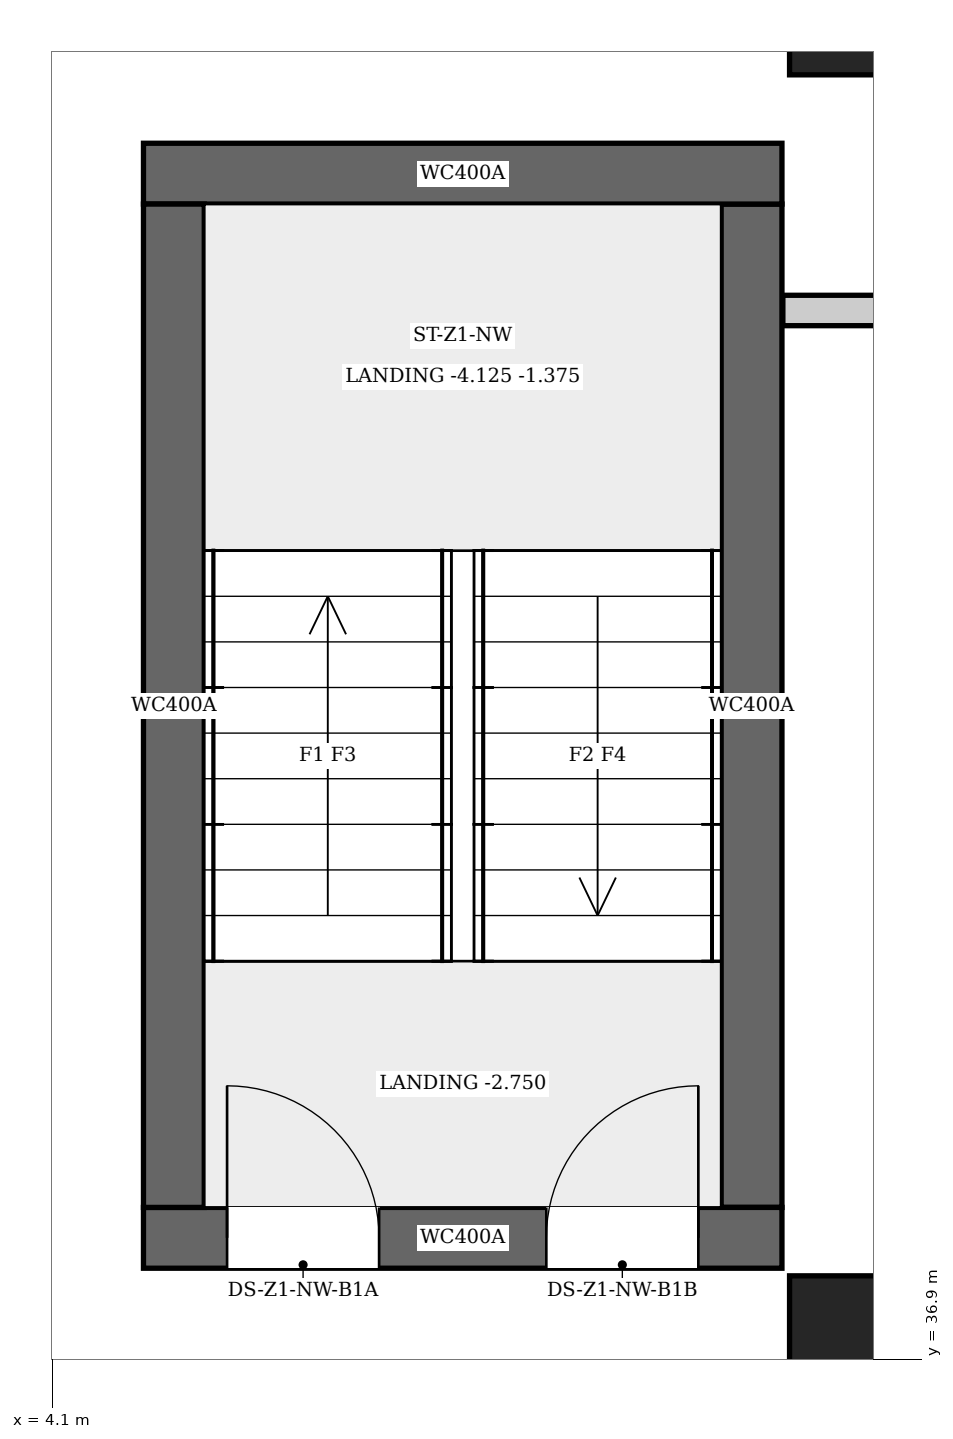
"""IFC4 building model, lengths in metres.
Left out: names, types, materials, properties, quantities, classifications, styles, units other than length and angle.
Written with IfcOpenShell. Run it as: python <this file> out.ifc"""

import sys

from ifc_helpers import new_model, si_unit, direction, frame, frame_2d, origin, origin_2d, place, context, subcontext, project, spatial, rectangle, extrude, element, fill, save


model = new_model("IFC4")
c1 = context("Model", 3, precision=1e-05, world=origin(), true_north=direction((0.0, 1.0)))
c2 = subcontext(c1, "Body", "Model", "MODEL_VIEW")
j1 = project(units=[si_unit("LENGTHUNIT", "METRE"), si_unit("PLANEANGLEUNIT", "RADIAN")], contexts=[c1])
p1 = place(None, origin())
s1 = spatial("IfcSite", under=j1, at=p1, CompositionType="ELEMENT")
p2 = place(p1, origin())
s2 = spatial("IfcBuilding", under=s1, at=p2, CompositionType="ELEMENT")
p3 = place(p2, frame((0.0, 0.0, -5.5)))
s3 = spatial("IfcBuildingStorey", under=s2, at=p3, CompositionType="ELEMENT", Elevation=-5.5)
p4 = place(p3, frame((4.7, 37.7, 0.0), z_axis=(0.0, 0.0, 1.0), x_axis=(1.0, 0.0, 0.0)))
e1 = element("IfcWall", 1, at=p4, inside=s3, PredefinedType="SHEAR", context=c2, shape_type="SweptSolid", body=[
    extrude(rectangle(XDim=4.2, YDim=0.4, at=frame_2d((2.1, 0.0))), origin(), (0.0, 0.0, 1.0), 5.5),
])
p5 = place(p4, frame((0.55, 0.0, 0.0)))
e2 = element("IfcOpeningElement", 2, at=p5, cuts=e1, PredefinedType="OPENING", context=c2, shape_type="SweptSolid", body=[
    extrude(rectangle(XDim=1.0, YDim=2.1, at=frame_2d((0.5, 1.05))), frame((0.0, 0.21, 0.0), z_axis=(0.0, -1.0, 0.0), x_axis=(1.0, 0.0, 0.0)), (0.0, 0.0, 1.0), 0.42),
])
p6 = place(p4, frame((2.65, 0.0, 0.0)))
e3 = element("IfcOpeningElement", 3, at=p6, cuts=e1, PredefinedType="OPENING", context=c2, shape_type="SweptSolid", body=[
    extrude(rectangle(XDim=1.0, YDim=2.1, at=frame_2d((0.5, 1.05))), frame((0.0, 0.21, 0.0), z_axis=(0.0, -1.0, 0.0), x_axis=(1.0, 0.0, 0.0)), (0.0, 0.0, 1.0), 0.42),
])
p7 = place(p3, frame((4.7, 44.7, 0.0), z_axis=(0.0, 0.0, 1.0), x_axis=(1.0, 0.0, 0.0)))
e4 = element("IfcWall", 4, at=p7, inside=s3, PredefinedType="SHEAR", context=c2, shape_type="SweptSolid", body=[
    extrude(rectangle(XDim=4.2, YDim=0.4, at=frame_2d((2.1, 0.0))), origin(), (0.0, 0.0, 1.0), 5.5),
])
for number, where, z_axis, x_axis in (
    (5, (4.9, 37.9, 0.0), (0.0, 0.0, 1.0), (0.0, 1.0, 0.0)),
    (6, (8.7, 37.9, 0.0), (0.0, 0.0, 1.0), (0.0, 1.0, 0.0)),
):
    element("IfcWall", number, at=place(p3, frame(where, z_axis=z_axis, x_axis=x_axis)), inside=s3, PredefinedType="SHEAR", context=c2, shape_type="SweptSolid", body=[
        extrude(rectangle(XDim=6.6, YDim=0.4, at=frame_2d((3.3, 0.0))), origin(), (0.0, 0.0, 1.0), 5.5),
    ])
for number, where, z_axis, x_axis in (
    (7, (9.6, 36.8, 0.0), (0.0, 0.0, 1.0), (1.0, 0.0, 0.0)),
    (8, (9.6, 46.0, 0.0), (0.0, 0.0, 1.0), (1.0, 0.0, 0.0)),
):
    element("IfcColumn", number, at=place(p3, frame(where, z_axis=z_axis, x_axis=x_axis)), inside=s3, PredefinedType="COLUMN", context=c2, shape_type="SweptSolid", body=[
        extrude(rectangle(XDim=1.3, YDim=1.3, at=origin_2d()), origin(), (0.0, 0.0, 1.0), 5.5),
    ])
p8 = place(p3, frame((8.906, 43.8, 0.0), z_axis=(0.0, 0.0, 1.0), x_axis=(1.0, 0.0, 0.0)))
e9 = element("IfcWall", 9, at=p8, inside=s3, PredefinedType="PARTITIONING", context=c2, shape_type="SweptSolid", body=[
    extrude(rectangle(XDim=14.888, YDim=0.2, at=frame_2d((7.444, 0.0))), origin(), (0.0, 0.0, 1.0), 5.15),
])
p9 = place(p8, frame((6.944, 0.0, 0.0)))
e10 = element("IfcOpeningElement", 10, at=p9, cuts=e9, PredefinedType="OPENING", context=c2, shape_type="SweptSolid", body=[
    extrude(rectangle(XDim=1.0, YDim=2.1, at=frame_2d((0.5, 1.05))), frame((0.0, 0.11, 0.0), z_axis=(0.0, -1.0, 0.0), x_axis=(1.0, 0.0, 0.0)), (0.0, 0.0, 1.0), 0.22),
])
p10 = place(p5, origin())
e11 = element("IfcDoor", 11, at=p10, inside=s3, OperationType="SINGLE_SWING_RIGHT", PredefinedType="DOOR", context=c2, shape_type="SweptSolid", body=[
    extrude(rectangle(XDim=1.0, YDim=2.1, at=frame_2d((0.5, 1.05))), frame((0.0, 0.025, 0.0), z_axis=(0.0, -1.0, 0.0), x_axis=(1.0, 0.0, 0.0)), (0.0, 0.0, 1.0), 0.05),
])
fill(e2, e11)
p11 = place(p6, origin())
e12 = element("IfcDoor", 12, at=p11, inside=s3, OperationType="SINGLE_SWING_LEFT", PredefinedType="DOOR", context=c2, shape_type="SweptSolid", body=[
    extrude(rectangle(XDim=1.0, YDim=2.1, at=frame_2d((0.5, 1.05))), frame((0.0, 0.025, 0.0), z_axis=(0.0, -1.0, 0.0), x_axis=(1.0, 0.0, 0.0)), (0.0, 0.0, 1.0), 0.05),
])
fill(e3, e12)
save(model, sys.argv[1])
